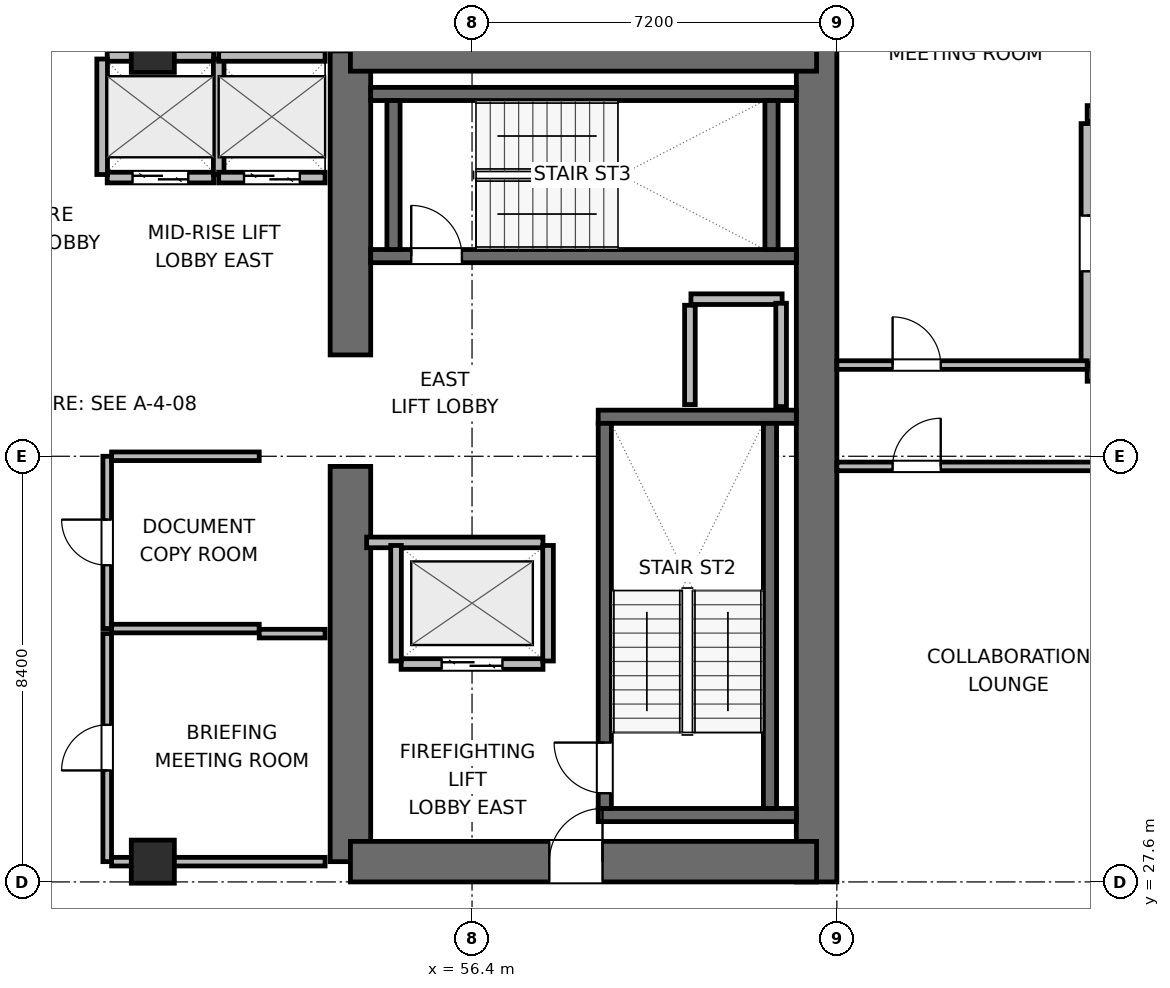
"""IFC4 building model, lengths in metres.
Left out: names, types, materials, properties, quantities, classifications, styles, units other than length and angle.
Written with IfcOpenShell. Run it as: python <this file> out.ifc"""

import sys

from ifc_helpers import new_model, si_unit, direction, frame, frame_2d, origin, origin_2d, place, context, subcontext, project, spatial, rectangle, extrude, element, fill, save


model = new_model("IFC4")
c1 = context("Model", 3, precision=1e-05, world=origin(), true_north=direction((0.0, 1.0)))
c2 = subcontext(c1, "Body", "Model", "MODEL_VIEW")
j1 = project(units=[si_unit("LENGTHUNIT", "METRE"), si_unit("PLANEANGLEUNIT", "RADIAN")], contexts=[c1])
p1 = place(None, origin())
s1 = spatial("IfcSite", under=j1, at=p1, CompositionType="ELEMENT")
p2 = place(p1, origin())
s2 = spatial("IfcBuilding", under=s1, at=p2, CompositionType="ELEMENT")
p3 = place(p2, frame((0.0, 0.0, 141.6)))
s3 = spatial("IfcBuildingStorey", under=s2, at=p3, CompositionType="ELEMENT", Elevation=141.6)
p4 = place(p3, frame((54.0, 28.0, 0.0), z_axis=(0.0, 0.0, 1.0), x_axis=(0.0, 1.0, 0.0)))
e1 = element("IfcWall", 1, at=p4, inside=s3, PredefinedType="SHEAR", context=c2, shape_type="SweptSolid", body=[
    extrude(rectangle(XDim=7.8, YDim=0.8, at=frame_2d((3.9, 0.0))), origin(), (0.0, 0.0, 1.0), 3.9),
])
p5 = place(p3, frame((54.0, 38.0, 0.0), z_axis=(0.0, 0.0, 1.0), x_axis=(0.0, 1.0, 0.0)))
e2 = element("IfcWall", 2, at=p5, inside=s3, PredefinedType="SHEAR", context=c2, shape_type="SweptSolid", body=[
    extrude(rectangle(XDim=6.0, YDim=0.8, at=frame_2d((3.0, 0.0))), origin(), (0.0, 0.0, 1.0), 3.9),
])
p6 = place(p3, frame((63.2, 27.6, 0.0), z_axis=(0.0, 0.0, 1.0), x_axis=(0.0, 1.0, 0.0)))
e3 = element("IfcWall", 3, at=p6, inside=s3, PredefinedType="SHEAR", context=c2, shape_type="SweptSolid", body=[
    extrude(rectangle(XDim=16.8, YDim=0.8, at=frame_2d((8.4, 0.0))), origin(), (0.0, 0.0, 1.0), 3.9),
])
p7 = place(p3, frame((54.0, 28.0, 0.0), z_axis=(0.0, 0.0, 1.0), x_axis=(1.0, 0.0, 0.0)))
e4 = element("IfcWall", 4, at=p7, inside=s3, PredefinedType="SHEAR", context=c2, shape_type="SweptSolid", body=[
    extrude(rectangle(XDim=9.2, YDim=0.8, at=frame_2d((4.6, 0.0))), origin(), (0.0, 0.0, 1.0), 3.9),
])
p8 = place(p7, frame((3.925, 0.0, 0.0)))
e5 = element("IfcOpeningElement", 5, at=p8, cuts=e4, PredefinedType="OPENING", context=c2, shape_type="SweptSolid", body=[
    extrude(rectangle(XDim=1.05, YDim=2.04, at=frame_2d((0.525, 1.02))), frame((0.0, 0.41, 0.0), z_axis=(0.0, -1.0, 0.0), x_axis=(1.0, 0.0, 0.0)), (0.0, 0.0, 1.0), 0.82),
])
p9 = place(p3, frame((54.0, 44.0, 0.0), z_axis=(0.0, 0.0, 1.0), x_axis=(1.0, 0.0, 0.0)))
e6 = element("IfcWall", 6, at=p9, inside=s3, PredefinedType="SHEAR", context=c2, shape_type="SweptSolid", body=[
    extrude(rectangle(XDim=9.2, YDim=0.8, at=frame_2d((4.6, 0.0))), origin(), (0.0, 0.0, 1.0), 3.9),
])
for number, where, z_axis, x_axis in (
    (7, (58.89, 28.92, 0.0), (0.0, 0.0, 1.0), (1.0, 0.0, 0.0)),
    (8, (58.89, 36.78, 0.0), (0.0, 0.0, 1.0), (1.0, 0.0, 0.0)),
):
    element("IfcWall", number, at=place(p3, frame(where, z_axis=z_axis, x_axis=x_axis)), inside=s3, PredefinedType="SHEAR", context=c2, shape_type="SweptSolid", body=[
        extrude(rectangle(XDim=3.91, YDim=0.26, at=frame_2d((1.955, 0.0))), origin(), (0.0, 0.0, 1.0), 3.9),
    ])
p10 = place(p3, frame((59.02, 29.05, 0.0), z_axis=(0.0, 0.0, 1.0), x_axis=(0.0, 1.0, 0.0)))
e9 = element("IfcWall", 9, at=p10, inside=s3, PredefinedType="SHEAR", context=c2, shape_type="SweptSolid", body=[
    extrude(rectangle(XDim=7.6, YDim=0.26, at=frame_2d((3.8, 0.0))), origin(), (0.0, 0.0, 1.0), 3.9),
])
p11 = place(p10, frame((0.3, 0.0, 0.0)))
e10 = element("IfcOpeningElement", 10, at=p11, cuts=e9, PredefinedType="OPENING", context=c2, shape_type="SweptSolid", body=[
    extrude(rectangle(XDim=1.0, YDim=2.04, at=frame_2d((0.5, 1.02))), frame((0.0, 0.14, 0.0), z_axis=(0.0, -1.0, 0.0), x_axis=(1.0, 0.0, 0.0)), (0.0, 0.0, 1.0), 0.28),
])
p12 = place(p3, frame((62.28, 29.05, 0.0), z_axis=(0.0, 0.0, 1.0), x_axis=(0.0, 1.0, 0.0)))
e11 = element("IfcWall", 11, at=p12, inside=s3, PredefinedType="SHEAR", context=c2, shape_type="SweptSolid", body=[
    extrude(rectangle(XDim=7.6, YDim=0.26, at=frame_2d((3.8, 0.0))), origin(), (0.0, 0.0, 1.0), 3.9),
])
p13 = place(p3, frame((54.4, 39.95, 0.0), z_axis=(0.0, 0.0, 1.0), x_axis=(1.0, 0.0, 0.0)))
e12 = element("IfcWall", 12, at=p13, inside=s3, PredefinedType="SHEAR", context=c2, shape_type="SweptSolid", body=[
    extrude(rectangle(XDim=8.4, YDim=0.26, at=frame_2d((4.2, 0.0))), origin(), (0.0, 0.0, 1.0), 3.9),
])
p14 = place(p13, frame((0.8, 0.0, 0.0)))
e13 = element("IfcOpeningElement", 13, at=p14, cuts=e12, PredefinedType="OPENING", context=c2, shape_type="SweptSolid", body=[
    extrude(rectangle(XDim=1.0, YDim=2.04, at=frame_2d((0.5, 1.02))), frame((0.0, 0.14, 0.0), z_axis=(0.0, -1.0, 0.0), x_axis=(1.0, 0.0, 0.0)), (0.0, 0.0, 1.0), 0.28),
])
p15 = place(p3, frame((54.4, 43.15, 0.0), z_axis=(0.0, 0.0, 1.0), x_axis=(1.0, 0.0, 0.0)))
e14 = element("IfcWall", 14, at=p15, inside=s3, PredefinedType="SHEAR", context=c2, shape_type="SweptSolid", body=[
    extrude(rectangle(XDim=8.4, YDim=0.26, at=frame_2d((4.2, 0.0))), origin(), (0.0, 0.0, 1.0), 3.9),
])
for number, where, z_axis, x_axis in (
    (15, (54.85, 40.08, 0.0), (0.0, 0.0, 1.0), (0.0, 1.0, 0.0)),
    (16, (62.31, 40.08, 0.0), (0.0, 0.0, 1.0), (0.0, 1.0, 0.0)),
):
    element("IfcWall", number, at=place(p3, frame(where, z_axis=z_axis, x_axis=x_axis)), inside=s3, PredefinedType="SHEAR", context=c2, shape_type="SweptSolid", body=[
        extrude(rectangle(XDim=2.94, YDim=0.26, at=frame_2d((1.47, 0.0))), origin(), (0.0, 0.0, 1.0), 3.9),
    ])
for number, where, z_axis, x_axis in (
    (17, (50.1, 28.0, 0.0), (0.0, 0.0, 1.0), (1.0, 0.0, 0.0)),
    (18, (50.1, 44.0, 0.0), (0.0, 0.0, 1.0), (1.0, 0.0, 0.0)),
):
    element("IfcColumn", number, at=place(p3, frame(where, z_axis=z_axis, x_axis=x_axis)), inside=s3, PredefinedType="COLUMN", context=c2, shape_type="SweptSolid", body=[
        extrude(rectangle(XDim=0.85, YDim=0.85, at=origin_2d()), origin(), (0.0, 0.0, 1.0), 3.9),
    ])
p16 = place(p3, frame((70.64, 42.76, 0.0), z_axis=(0.0, 0.0, 1.0), x_axis=(-1.0, 0.0, 0.0)))
e19 = element("IfcWall", 19, at=p16, inside=s3, PredefinedType="SOLIDWALL", context=c2, shape_type="SweptSolid", body=[
    extrude(rectangle(XDim=2.1, YDim=0.32, at=frame_2d((1.05, 0.0))), origin(), (0.0, 0.0, 1.0), 2.185),
])
p17 = place(p3, frame((68.54, 42.565, 0.0), z_axis=(0.0, 0.0, 1.0), x_axis=(0.0, -1.0, 0.0)))
e20 = element("IfcWall", 20, at=p17, inside=s3, PredefinedType="SOLIDWALL", context=c2, shape_type="SweptSolid", body=[
    extrude(rectangle(XDim=4.73, YDim=0.24, at=frame_2d((2.365, 0.0))), origin(), (0.0, 0.0, 1.0), 3.122),
])
p18 = place(p17, frame((1.815, 0.0, 0.0)))
e21 = element("IfcOpeningElement", 21, at=p18, cuts=e20, PredefinedType="OPENING", context=c2, shape_type="SweptSolid", body=[
    extrude(rectangle(XDim=1.1, YDim=2.04, at=frame_2d((0.55, 1.02))), frame((0.0, 0.13, 0.0), z_axis=(0.0, -1.0, 0.0), x_axis=(1.0, 0.0, 0.0)), (0.0, 0.0, 1.0), 0.26),
])
p19 = place(p3, frame((68.54, 37.64, 0.0), z_axis=(0.0, 0.0, 1.0), x_axis=(1.0, 0.0, 0.0)))
e22 = element("IfcWall", 22, at=p19, inside=s3, PredefinedType="SOLIDWALL", context=c2, shape_type="SweptSolid", body=[
    extrude(rectangle(XDim=2.1, YDim=0.32, at=frame_2d((1.05, 0.0))), origin(), (0.0, 0.0, 1.0), 2.185),
])
p20 = place(p3, frame((60.72, 39.1, 0.0), z_axis=(0.0, 0.0, 1.0), x_axis=(1.0, 0.0, 0.0)))
e23 = element("IfcWall", 23, at=p20, inside=s3, PredefinedType="PARTITIONING", context=c2, shape_type="SweptSolid", body=[
    extrude(rectangle(XDim=1.8, YDim=0.21, at=frame_2d((0.9, 0.0))), origin(), (0.0, 0.0, 1.0), 3.6),
])
p21 = place(p3, frame((60.7, 37.02, 0.0), z_axis=(0.0, 0.0, 1.0), x_axis=(0.0, 1.0, 0.0)))
e24 = element("IfcWall", 24, at=p21, inside=s3, PredefinedType="PARTITIONING", context=c2, shape_type="SweptSolid", body=[
    extrude(rectangle(XDim=1.96, YDim=0.21, at=frame_2d((0.98, 0.0))), origin(), (0.0, 0.0, 1.0), 3.6),
])
p22 = place(p3, frame((62.5, 36.98, 0.0), z_axis=(0.0, 0.0, 1.0), x_axis=(0.0, 1.0, 0.0)))
e25 = element("IfcWall", 25, at=p22, inside=s3, PredefinedType="PARTITIONING", context=c2, shape_type="SweptSolid", body=[
    extrude(rectangle(XDim=2.04, YDim=0.21, at=frame_2d((1.02, 0.0))), origin(), (0.0, 0.0, 1.0), 3.6),
])
p23 = place(p3, frame((55.0, 31.9, 0.0), z_axis=(0.0, 0.0, 1.0), x_axis=(1.0, 0.0, 0.0)))
e26 = element("IfcWall", 26, at=p23, inside=s3, PredefinedType="PARTITIONING", context=c2, shape_type="SweptSolid", body=[
    extrude(rectangle(XDim=2.8, YDim=0.21, at=frame_2d((1.4, 0.0))), origin(), (0.0, 0.0, 1.0), 3.6),
])
p24 = place(p23, frame((0.8, 0.0, 0.0)))
e27 = element("IfcOpeningElement", 27, at=p24, cuts=e26, PredefinedType="OPENING", context=c2, shape_type="SweptSolid", body=[
    extrude(rectangle(XDim=1.2, YDim=2.04, at=frame_2d((0.6, 1.02))), frame((0.0, 0.115, 0.0), z_axis=(0.0, -1.0, 0.0), x_axis=(1.0, 0.0, 0.0)), (0.0, 0.0, 1.0), 0.23),
])
p25 = place(p3, frame((54.32, 34.3, 0.0), z_axis=(0.0, 0.0, 1.0), x_axis=(1.0, 0.0, 0.0)))
e28 = element("IfcWall", 28, at=p25, inside=s3, PredefinedType="PARTITIONING", context=c2, shape_type="SweptSolid", body=[
    extrude(rectangle(XDim=3.48, YDim=0.21, at=frame_2d((1.74, 0.0))), origin(), (0.0, 0.0, 1.0), 3.6),
])
for number, where, z_axis, x_axis in (
    (29, (54.9, 31.96, 0.0), (0.0, 0.0, 1.0), (0.0, 1.0, 0.0)),
    (30, (57.9, 31.96, 0.0), (0.0, 0.0, 1.0), (0.0, 1.0, 0.0)),
):
    element("IfcWall", number, at=place(p3, frame(where, z_axis=z_axis, x_axis=x_axis)), inside=s3, PredefinedType="PARTITIONING", context=c2, shape_type="SweptSolid", body=[
        extrude(rectangle(XDim=2.28, YDim=0.21, at=frame_2d((1.14, 0.0))), origin(), (0.0, 0.0, 1.0), 3.6),
    ])
p26 = place(p3, frame((49.2, 41.5, 0.0), z_axis=(0.0, 0.0, 1.0), x_axis=(1.0, 0.0, 0.0)))
e31 = element("IfcWall", 31, at=p26, inside=s3, PredefinedType="PARTITIONING", context=c2, shape_type="SweptSolid", body=[
    extrude(rectangle(XDim=2.1, YDim=0.21, at=frame_2d((1.05, 0.0))), origin(), (0.0, 0.0, 1.0), 3.6),
])
p27 = place(p26, frame((0.5, 0.0, 0.0)))
e32 = element("IfcOpeningElement", 32, at=p27, cuts=e31, PredefinedType="OPENING", context=c2, shape_type="SweptSolid", body=[
    extrude(rectangle(XDim=1.1, YDim=2.04, at=frame_2d((0.55, 1.02))), frame((0.0, 0.115, 0.0), z_axis=(0.0, -1.0, 0.0), x_axis=(1.0, 0.0, 0.0)), (0.0, 0.0, 1.0), 0.23),
])
p28 = place(p3, frame((49.2, 43.9, 0.0), z_axis=(0.0, 0.0, 1.0), x_axis=(1.0, 0.0, 0.0)))
e33 = element("IfcWall", 33, at=p28, inside=s3, PredefinedType="PARTITIONING", context=c2, shape_type="SweptSolid", body=[
    extrude(rectangle(XDim=2.1, YDim=0.21, at=frame_2d((1.05, 0.0))), origin(), (0.0, 0.0, 1.0), 2.485),
])
for number, where, z_axis, x_axis in (
    (34, (49.1, 41.56, 0.0), (0.0, 0.0, 1.0), (0.0, 1.0, 0.0)),
    (35, (51.4, 41.56, 0.0), (0.0, 0.0, 1.0), (0.0, 1.0, 0.0)),
):
    element("IfcWall", number, at=place(p3, frame(where, z_axis=z_axis, x_axis=x_axis)), inside=s3, PredefinedType="PARTITIONING", context=c2, shape_type="SweptSolid", body=[
        extrude(rectangle(XDim=2.28, YDim=0.21, at=frame_2d((1.14, 0.0))), origin(), (0.0, 0.0, 1.0), 3.6),
    ])
p29 = place(p3, frame((51.4, 41.5, 0.0), z_axis=(0.0, 0.0, 1.0), x_axis=(1.0, 0.0, 0.0)))
e36 = element("IfcWall", 36, at=p29, inside=s3, PredefinedType="PARTITIONING", context=c2, shape_type="SweptSolid", body=[
    extrude(rectangle(XDim=2.1, YDim=0.21, at=frame_2d((1.05, 0.0))), origin(), (0.0, 0.0, 1.0), 3.6),
])
p30 = place(p29, frame((0.5, 0.0, 0.0)))
e37 = element("IfcOpeningElement", 37, at=p30, cuts=e36, PredefinedType="OPENING", context=c2, shape_type="SweptSolid", body=[
    extrude(rectangle(XDim=1.1, YDim=2.04, at=frame_2d((0.55, 1.02))), frame((0.0, 0.115, 0.0), z_axis=(0.0, -1.0, 0.0), x_axis=(1.0, 0.0, 0.0)), (0.0, 0.0, 1.0), 0.23),
])
p31 = place(p3, frame((51.4, 43.9, 0.0), z_axis=(0.0, 0.0, 1.0), x_axis=(1.0, 0.0, 0.0)))
e38 = element("IfcWall", 38, at=p31, inside=s3, PredefinedType="PARTITIONING", context=c2, shape_type="SweptSolid", body=[
    extrude(rectangle(XDim=2.1, YDim=0.21, at=frame_2d((1.05, 0.0))), origin(), (0.0, 0.0, 1.0), 2.485),
])
p32 = place(p3, frame((49.2, 32.6, 0.0), z_axis=(0.0, 0.0, 1.0), x_axis=(0.0, 1.0, 0.0)))
e39 = element("IfcWall", 39, at=p32, inside=s3, PredefinedType="PARTITIONING", context=c2, shape_type="SweptSolid", body=[
    extrude(rectangle(XDim=3.4, YDim=0.17, at=frame_2d((1.7, 0.0))), origin(), (0.0, 0.0, 1.0), 3.6),
])
p33 = place(p32, frame((1.25, 0.0, 0.0)))
e40 = element("IfcOpeningElement", 40, at=p33, cuts=e39, PredefinedType="OPENING", context=c2, shape_type="SweptSolid", body=[
    extrude(rectangle(XDim=0.9, YDim=2.02, at=frame_2d((0.45, 1.01))), frame((0.0, 0.095, 0.0), z_axis=(0.0, -1.0, 0.0), x_axis=(1.0, 0.0, 0.0)), (0.0, 0.0, 1.0), 0.19),
])
for number, where, z_axis, x_axis in (
    (41, (49.287, 32.6, 0.0), (0.0, 0.0, 1.0), (1.0, 0.0, 0.0)),
    (42, (49.287, 36.0, 0.0), (0.0, 0.0, 1.0), (1.0, 0.0, 0.0)),
):
    element("IfcWall", number, at=place(p3, frame(where, z_axis=z_axis, x_axis=x_axis)), inside=s3, PredefinedType="PARTITIONING", context=c2, shape_type="SweptSolid", body=[
        extrude(rectangle(XDim=2.913, YDim=0.17, at=frame_2d((1.457, 0.0))), origin(), (0.0, 0.0, 1.0), 3.6),
    ])
p34 = place(p3, frame((49.2, 28.0, 0.0), z_axis=(0.0, 0.0, 1.0), x_axis=(0.0, 1.0, 0.0)))
e43 = element("IfcWall", 43, at=p34, inside=s3, PredefinedType="PARTITIONING", context=c2, shape_type="SweptSolid", body=[
    extrude(rectangle(XDim=4.5, YDim=0.17, at=frame_2d((2.25, 0.0))), origin(), (0.0, 0.0, 1.0), 3.6),
])
p35 = place(p34, frame((1.8, 0.0, 0.0)))
e44 = element("IfcOpeningElement", 44, at=p35, cuts=e43, PredefinedType="OPENING", context=c2, shape_type="SweptSolid", body=[
    extrude(rectangle(XDim=0.9, YDim=2.02, at=frame_2d((0.45, 1.01))), frame((0.0, 0.095, 0.0), z_axis=(0.0, -1.0, 0.0), x_axis=(1.0, 0.0, 0.0)), (0.0, 0.0, 1.0), 0.19),
])
p36 = place(p3, frame((49.287, 28.0, 0.0), z_axis=(0.0, 0.0, 1.0), x_axis=(1.0, 0.0, 0.0)))
e45 = element("IfcWall", 45, at=p36, inside=s3, PredefinedType="PARTITIONING", context=c2, shape_type="SweptSolid", body=[
    extrude(rectangle(XDim=4.213, YDim=0.17, at=frame_2d((2.106, 0.0))), origin(), (0.0, 0.0, 1.0), 2.485),
])
p37 = place(p3, frame((52.2, 32.5, 0.0), z_axis=(0.0, 0.0, 1.0), x_axis=(1.0, 0.0, 0.0)))
e46 = element("IfcWall", 46, at=p37, inside=s3, PredefinedType="PARTITIONING", context=c2, shape_type="SweptSolid", body=[
    extrude(rectangle(XDim=1.3, YDim=0.17, at=frame_2d((0.65, 0.0))), origin(), (0.0, 0.0, 1.0), 3.6),
])
p38 = place(p3, frame((63.6, 35.8, 0.0), z_axis=(0.0, 0.0, 1.0), x_axis=(1.0, 0.0, 0.0)))
e47 = element("IfcWall", 47, at=p38, inside=s3, PredefinedType="PARTITIONING", context=c2, shape_type="SweptSolid", body=[
    extrude(rectangle(XDim=6.955, YDim=0.17, at=frame_2d((3.478, 0.0))), origin(), (0.0, 0.0, 1.0), 2.135),
])
p39 = place(p38, frame((1.1, 0.0, 0.0)))
e48 = element("IfcOpeningElement", 48, at=p39, cuts=e47, PredefinedType="OPENING", context=c2, shape_type="SweptSolid", body=[
    extrude(rectangle(XDim=0.95, YDim=2.04, at=frame_2d((0.475, 1.02))), frame((0.0, 0.095, 0.0), z_axis=(0.0, -1.0, 0.0), x_axis=(1.0, 0.0, 0.0)), (0.0, 0.0, 1.0), 0.19),
])
p40 = place(p3, frame((63.6, 37.8, 0.0), z_axis=(0.0, 0.0, 1.0), x_axis=(1.0, 0.0, 0.0)))
e49 = element("IfcWall", 49, at=p40, inside=s3, PredefinedType="PARTITIONING", context=c2, shape_type="SweptSolid", body=[
    extrude(rectangle(XDim=4.94, YDim=0.17, at=frame_2d((2.47, 0.0))), origin(), (0.0, 0.0, 1.0), 3.6),
])
p41 = place(p40, frame((1.1, 0.0, 0.0)))
e50 = element("IfcOpeningElement", 50, at=p41, cuts=e49, PredefinedType="OPENING", context=c2, shape_type="SweptSolid", body=[
    extrude(rectangle(XDim=0.95, YDim=2.04, at=frame_2d((0.475, 1.02))), frame((0.0, 0.095, 0.0), z_axis=(0.0, -1.0, 0.0), x_axis=(1.0, 0.0, 0.0)), (0.0, 0.0, 1.0), 0.19),
])
p42 = place(p18, origin())
e51 = element("IfcDoor", 51, at=p42, inside=s3, OperationType="SINGLE_SWING_LEFT", PredefinedType="DOOR", context=c2, shape_type="SweptSolid", body=[
    extrude(rectangle(XDim=1.1, YDim=2.04, at=frame_2d((0.55, 1.02))), frame((0.0, 0.025, 0.0), z_axis=(0.0, -1.0, 0.0), x_axis=(1.0, 0.0, 0.0)), (0.0, 0.0, 1.0), 0.05),
])
fill(e21, e51)
p43 = place(p11, origin())
e52 = element("IfcDoor", 52, at=p43, inside=s3, OperationType="SINGLE_SWING_RIGHT", PredefinedType="DOOR", context=c2, shape_type="SweptSolid", body=[
    extrude(rectangle(XDim=1.0, YDim=2.04, at=frame_2d((0.5, 1.02))), frame((0.0, 0.025, 0.0), z_axis=(0.0, -1.0, 0.0), x_axis=(1.0, 0.0, 0.0)), (0.0, 0.0, 1.0), 0.05),
])
fill(e10, e52)
p44 = place(p14, origin())
e53 = element("IfcDoor", 53, at=p44, inside=s3, OperationType="SINGLE_SWING_LEFT", PredefinedType="DOOR", context=c2, shape_type="SweptSolid", body=[
    extrude(rectangle(XDim=1.0, YDim=2.04, at=frame_2d((0.5, 1.02))), frame((0.0, 0.025, 0.0), z_axis=(0.0, -1.0, 0.0), x_axis=(1.0, 0.0, 0.0)), (0.0, 0.0, 1.0), 0.05),
])
fill(e13, e53)
p45 = place(p24, origin())
e54 = element("IfcDoor", 54, at=p45, inside=s3, OperationType="DOUBLE_DOOR_SLIDING", PredefinedType="DOOR", context=c2, shape_type="SweptSolid", body=[
    extrude(rectangle(XDim=1.2, YDim=2.04, at=frame_2d((0.6, 1.02))), frame((0.0, 0.025, 0.0), z_axis=(0.0, -1.0, 0.0), x_axis=(1.0, 0.0, 0.0)), (0.0, 0.0, 1.0), 0.05),
])
fill(e27, e54)
p46 = place(p27, origin())
e55 = element("IfcDoor", 55, at=p46, inside=s3, OperationType="DOUBLE_DOOR_SLIDING", PredefinedType="DOOR", context=c2, shape_type="SweptSolid", body=[
    extrude(rectangle(XDim=1.1, YDim=2.04, at=frame_2d((0.55, 1.02))), frame((0.0, 0.025, 0.0), z_axis=(0.0, -1.0, 0.0), x_axis=(1.0, 0.0, 0.0)), (0.0, 0.0, 1.0), 0.05),
])
fill(e32, e55)
p47 = place(p30, origin())
e56 = element("IfcDoor", 56, at=p47, inside=s3, OperationType="DOUBLE_DOOR_SLIDING", PredefinedType="DOOR", context=c2, shape_type="SweptSolid", body=[
    extrude(rectangle(XDim=1.1, YDim=2.04, at=frame_2d((0.55, 1.02))), frame((0.0, 0.025, 0.0), z_axis=(0.0, -1.0, 0.0), x_axis=(1.0, 0.0, 0.0)), (0.0, 0.0, 1.0), 0.05),
])
fill(e37, e56)
p48 = place(p8, origin())
e57 = element("IfcDoor", 57, at=p48, inside=s3, OperationType="SINGLE_SWING_RIGHT", PredefinedType="DOOR", context=c2, shape_type="SweptSolid", body=[
    extrude(rectangle(XDim=1.05, YDim=2.04, at=frame_2d((0.525, 1.02))), frame((0.0, 0.025, 0.0), z_axis=(0.0, -1.0, 0.0), x_axis=(1.0, 0.0, 0.0)), (0.0, 0.0, 1.0), 0.05),
])
fill(e5, e57)
p49 = place(p33, origin())
e58 = element("IfcDoor", 58, at=p49, inside=s3, OperationType="SINGLE_SWING_RIGHT", PredefinedType="DOOR", context=c2, shape_type="SweptSolid", body=[
    extrude(rectangle(XDim=0.9, YDim=2.02, at=frame_2d((0.45, 1.01))), frame((0.0, 0.025, 0.0), z_axis=(0.0, -1.0, 0.0), x_axis=(1.0, 0.0, 0.0)), (0.0, 0.0, 1.0), 0.05),
])
fill(e40, e58)
p50 = place(p35, origin())
e59 = element("IfcDoor", 59, at=p50, inside=s3, OperationType="SINGLE_SWING_LEFT", PredefinedType="DOOR", context=c2, shape_type="SweptSolid", body=[
    extrude(rectangle(XDim=0.9, YDim=2.02, at=frame_2d((0.45, 1.01))), frame((0.0, 0.025, 0.0), z_axis=(0.0, -1.0, 0.0), x_axis=(1.0, 0.0, 0.0)), (0.0, 0.0, 1.0), 0.05),
])
fill(e44, e59)
p51 = place(p39, origin())
e60 = element("IfcDoor", 60, at=p51, inside=s3, OperationType="SINGLE_SWING_RIGHT", PredefinedType="DOOR", context=c2, shape_type="SweptSolid", body=[
    extrude(rectangle(XDim=0.95, YDim=2.04, at=frame_2d((0.475, 1.02))), frame((0.0, 0.025, 0.0), z_axis=(0.0, -1.0, 0.0), x_axis=(1.0, 0.0, 0.0)), (0.0, 0.0, 1.0), 0.05),
])
fill(e48, e60)
p52 = place(p41, origin())
e61 = element("IfcDoor", 61, at=p52, inside=s3, OperationType="SINGLE_SWING_LEFT", PredefinedType="DOOR", context=c2, shape_type="SweptSolid", body=[
    extrude(rectangle(XDim=0.95, YDim=2.04, at=frame_2d((0.475, 1.02))), frame((0.0, 0.025, 0.0), z_axis=(0.0, -1.0, 0.0), x_axis=(1.0, 0.0, 0.0)), (0.0, 0.0, 1.0), 0.05),
])
fill(e50, e61)
save(model, sys.argv[1])
